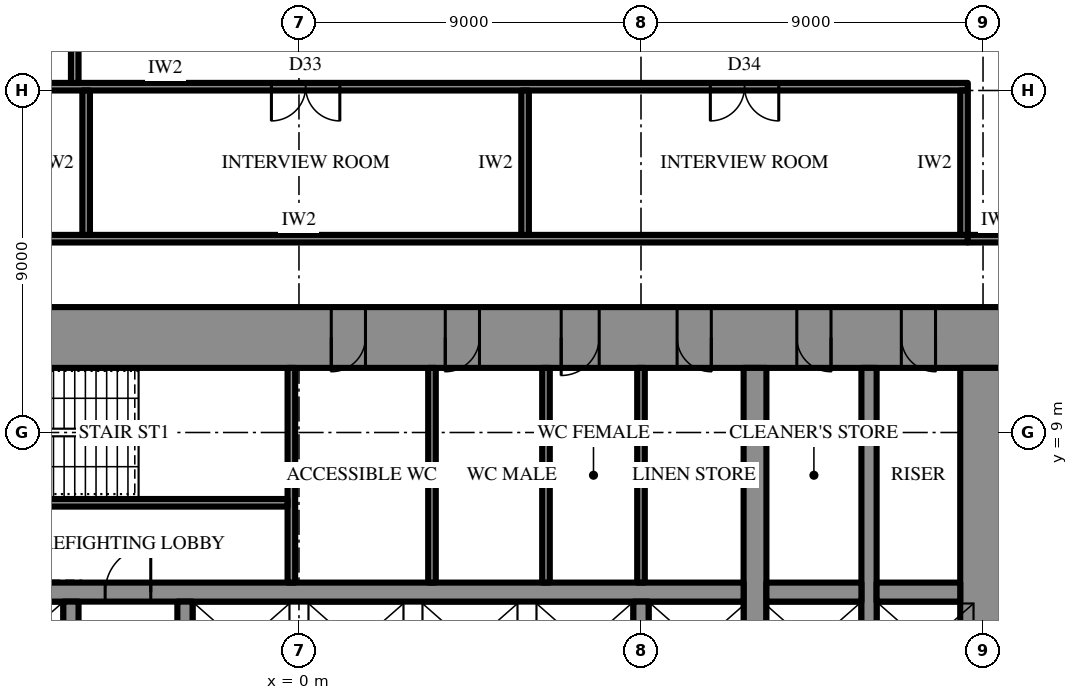
"""IFC4 building model, lengths in metres.
Left out: names, types, materials, properties, quantities, classifications, styles, units other than length and angle.
Written with IfcOpenShell. Run it as: python <this file> out.ifc"""

import sys

from ifc_helpers import new_model, si_unit, direction, frame, frame_2d, origin, place, context, subcontext, project, spatial, rectangle, extrude, element, fill, save


model = new_model("IFC4")
c1 = context("Model", 3, precision=1e-05, world=origin(), true_north=direction((0.0, 1.0)))
c2 = subcontext(c1, "Body", "Model", "MODEL_VIEW")
j1 = project(units=[si_unit("LENGTHUNIT", "METRE"), si_unit("PLANEANGLEUNIT", "RADIAN")], contexts=[c1])
p1 = place(None, origin())
s1 = spatial("IfcSite", under=j1, at=p1, CompositionType="ELEMENT")
p2 = place(p1, origin())
s2 = spatial("IfcBuilding", under=s1, at=p2, CompositionType="ELEMENT")
p3 = place(p2, frame((0.0, 0.0, 78.1)))
s3 = spatial("IfcBuildingStorey", under=s2, at=p3, CompositionType="ELEMENT", Elevation=78.1)
p4 = place(p3, frame((-18.6, 11.5, 0.0), z_axis=(0.0, 0.0, 1.0), x_axis=(1.0, 0.0, 0.0)))
e1 = element("IfcWall", 1, at=p4, inside=s3, PredefinedType="SHEAR", context=c2, shape_type="SweptSolid", body=[
    extrude(rectangle(XDim=37.2, YDim=1.6, at=frame_2d((18.6, 0.0))), origin(), (0.0, 0.0, 1.0), 4.2),
])
p5 = place(p4, frame((19.45, 0.0, 0.0)))
e2 = element("IfcOpeningElement", 2, at=p5, cuts=e1, PredefinedType="OPENING", context=c2, shape_type="SweptSolid", body=[
    extrude(rectangle(XDim=0.9, YDim=2.2, at=frame_2d((0.45, 1.1))), frame((0.0, 0.81, 0.0), z_axis=(0.0, -1.0, 0.0), x_axis=(1.0, 0.0, 0.0)), (0.0, 0.0, 1.0), 1.62),
])
p6 = place(p4, frame((22.45, 0.0, 0.0)))
e3 = element("IfcOpeningElement", 3, at=p6, cuts=e1, PredefinedType="OPENING", context=c2, shape_type="SweptSolid", body=[
    extrude(rectangle(XDim=0.9, YDim=2.2, at=frame_2d((0.45, 1.1))), frame((0.0, 0.81, 0.0), z_axis=(0.0, -1.0, 0.0), x_axis=(1.0, 0.0, 0.0)), (0.0, 0.0, 1.0), 1.62),
])
p7 = place(p4, frame((25.5, 0.0, 0.0)))
e4 = element("IfcOpeningElement", 4, at=p7, cuts=e1, PredefinedType="OPENING", context=c2, shape_type="SweptSolid", body=[
    extrude(rectangle(XDim=1.0, YDim=2.2, at=frame_2d((0.5, 1.1))), frame((0.0, 0.81, 0.0), z_axis=(0.0, -1.0, 0.0), x_axis=(1.0, 0.0, 0.0)), (0.0, 0.0, 1.0), 1.62),
])
p8 = place(p4, frame((1.85, 0.0, 0.0)))
e5 = element("IfcOpeningElement", 5, at=p8, cuts=e1, PredefinedType="OPENING", context=c2, shape_type="SweptSolid", body=[
    extrude(rectangle(XDim=0.9, YDim=2.2, at=frame_2d((0.45, 1.1))), frame((0.0, 0.81, 0.0), z_axis=(0.0, -1.0, 0.0), x_axis=(1.0, 0.0, 0.0)), (0.0, 0.0, 1.0), 1.62),
])
p9 = place(p4, frame((4.6, 0.0, 0.0)))
e6 = element("IfcOpeningElement", 6, at=p9, cuts=e1, PredefinedType="OPENING", context=c2, shape_type="SweptSolid", body=[
    extrude(rectangle(XDim=0.9, YDim=2.2, at=frame_2d((0.45, 1.1))), frame((0.0, 0.81, 0.0), z_axis=(0.0, -1.0, 0.0), x_axis=(1.0, 0.0, 0.0)), (0.0, 0.0, 1.0), 1.62),
])
p10 = place(p4, frame((7.75, 0.0, 0.0)))
e7 = element("IfcOpeningElement", 7, at=p10, cuts=e1, PredefinedType="OPENING", context=c2, shape_type="SweptSolid", body=[
    extrude(rectangle(XDim=0.9, YDim=2.2, at=frame_2d((0.45, 1.1))), frame((0.0, 0.81, 0.0), z_axis=(0.0, -1.0, 0.0), x_axis=(1.0, 0.0, 0.0)), (0.0, 0.0, 1.0), 1.62),
])
p11 = place(p4, frame((28.55, 0.0, 0.0)))
e8 = element("IfcOpeningElement", 8, at=p11, cuts=e1, PredefinedType="OPENING", context=c2, shape_type="SweptSolid", body=[
    extrude(rectangle(XDim=0.9, YDim=2.2, at=frame_2d((0.45, 1.1))), frame((0.0, 0.81, 0.0), z_axis=(0.0, -1.0, 0.0), x_axis=(1.0, 0.0, 0.0)), (0.0, 0.0, 1.0), 1.62),
])
p12 = place(p4, frame((31.7, 0.0, 0.0)))
e9 = element("IfcOpeningElement", 9, at=p12, cuts=e1, PredefinedType="OPENING", context=c2, shape_type="SweptSolid", body=[
    extrude(rectangle(XDim=0.9, YDim=2.2, at=frame_2d((0.45, 1.1))), frame((0.0, 0.81, 0.0), z_axis=(0.0, -1.0, 0.0), x_axis=(1.0, 0.0, 0.0)), (0.0, 0.0, 1.0), 1.62),
])
p13 = place(p4, frame((34.45, 0.0, 0.0)))
e10 = element("IfcOpeningElement", 10, at=p13, cuts=e1, PredefinedType="OPENING", context=c2, shape_type="SweptSolid", body=[
    extrude(rectangle(XDim=0.9, YDim=2.2, at=frame_2d((0.45, 1.1))), frame((0.0, 0.81, 0.0), z_axis=(0.0, -1.0, 0.0), x_axis=(1.0, 0.0, 0.0)), (0.0, 0.0, 1.0), 1.62),
])
p14 = place(p3, frame((18.0, -10.7, 0.0), z_axis=(0.0, 0.0, 1.0), x_axis=(0.0, 1.0, 0.0)))
e11 = element("IfcWall", 11, at=p14, inside=s3, PredefinedType="SHEAR", context=c2, shape_type="SweptSolid", body=[
    extrude(rectangle(XDim=21.4, YDim=1.2, at=frame_2d((10.7, 0.0))), origin(), (0.0, 0.0, 1.0), 4.2),
])
p15 = place(p14, frame((9.8, 0.0, 0.0)))
e12 = element("IfcOpeningElement", 12, at=p15, cuts=e11, PredefinedType="OPENING", context=c2, shape_type="SweptSolid", body=[
    extrude(rectangle(XDim=1.8, YDim=2.4, at=frame_2d((0.9, 1.2))), frame((0.0, 0.61, 0.0), z_axis=(0.0, -1.0, 0.0), x_axis=(1.0, 0.0, 0.0)), (0.0, 0.0, 1.0), 1.22),
])
p16 = place(p3, frame((12.0, -10.7, 0.0), z_axis=(0.0, 0.0, 1.0), x_axis=(0.0, 1.0, 0.0)))
e13 = element("IfcWall", 13, at=p16, inside=s3, PredefinedType="SHEAR", context=c2, shape_type="SweptSolid", body=[
    extrude(rectangle(XDim=21.4, YDim=0.6, at=frame_2d((10.7, 0.0))), origin(), (0.0, 0.0, 1.0), 4.2),
])
p17 = place(p16, frame((9.8, 0.0, 0.0)))
e14 = element("IfcOpeningElement", 14, at=p17, cuts=e13, PredefinedType="OPENING", context=c2, shape_type="SweptSolid", body=[
    extrude(rectangle(XDim=1.8, YDim=2.4, at=frame_2d((0.9, 1.2))), frame((0.0, 0.31, 0.0), z_axis=(0.0, -1.0, 0.0), x_axis=(1.0, 0.0, 0.0)), (0.0, 0.0, 1.0), 0.62),
])
p18 = place(p3, frame((15.0, -10.7, 0.0), z_axis=(0.0, 0.0, 1.0), x_axis=(0.0, 1.0, 0.0)))
e15 = element("IfcWall", 15, at=p18, inside=s3, PredefinedType="SHEAR", context=c2, shape_type="SweptSolid", body=[
    extrude(rectangle(XDim=21.4, YDim=0.4, at=frame_2d((10.7, 0.0))), origin(), (0.0, 0.0, 1.0), 4.2),
])
p19 = place(p18, frame((9.8, 0.0, 0.0)))
e16 = element("IfcOpeningElement", 16, at=p19, cuts=e15, PredefinedType="OPENING", context=c2, shape_type="SweptSolid", body=[
    extrude(rectangle(XDim=1.8, YDim=2.4, at=frame_2d((0.9, 1.2))), frame((0.0, 0.21, 0.0), z_axis=(0.0, -1.0, 0.0), x_axis=(1.0, 0.0, 0.0)), (0.0, 0.0, 1.0), 0.42),
])
p20 = place(p3, frame((-11.7, 4.8, 0.0), z_axis=(0.0, 0.0, 1.0), x_axis=(1.0, 0.0, 0.0)))
e17 = element("IfcWall", 17, at=p20, inside=s3, PredefinedType="SHEAR", context=c2, shape_type="SweptSolid", body=[
    extrude(rectangle(XDim=23.4, YDim=0.5, at=frame_2d((11.7, 0.0))), origin(), (0.0, 0.0, 1.0), 4.2),
])
p21 = place(p20, frame((6.6, 0.0, 0.0)))
e18 = element("IfcOpeningElement", 18, at=p21, cuts=e17, PredefinedType="OPENING", context=c2, shape_type="SweptSolid", body=[
    extrude(rectangle(XDim=1.2, YDim=2.2, at=frame_2d((0.6, 1.1))), frame((0.0, 0.26, 0.0), z_axis=(0.0, -1.0, 0.0), x_axis=(1.0, 0.0, 0.0)), (0.0, 0.0, 1.0), 0.52),
])
p22 = place(p20, frame((3.6, 0.0, 0.0)))
e19 = element("IfcOpeningElement", 19, at=p22, cuts=e17, PredefinedType="OPENING", context=c2, shape_type="SweptSolid", body=[
    extrude(rectangle(XDim=1.2, YDim=2.2, at=frame_2d((0.6, 1.1))), frame((0.0, 0.26, 0.0), z_axis=(0.0, -1.0, 0.0), x_axis=(1.0, 0.0, 0.0)), (0.0, 0.0, 1.0), 0.52),
])
p23 = place(p3, frame((12.3, 4.8, 0.0), z_axis=(0.0, 0.0, 1.0), x_axis=(1.0, 0.0, 0.0)))
e20 = element("IfcWall", 20, at=p23, inside=s3, PredefinedType="SHEAR", context=c2, shape_type="SweptSolid", body=[
    extrude(rectangle(XDim=2.5, YDim=0.5, at=frame_2d((1.25, 0.0))), origin(), (0.0, 0.0, 1.0), 4.2),
])
p24 = place(p3, frame((15.2, 4.8, 0.0), z_axis=(0.0, 0.0, 1.0), x_axis=(1.0, 0.0, 0.0)))
e21 = element("IfcWall", 21, at=p24, inside=s3, PredefinedType="SHEAR", context=c2, shape_type="SweptSolid", body=[
    extrude(rectangle(XDim=2.2, YDim=0.5, at=frame_2d((1.1, 0.0))), origin(), (0.0, 0.0, 1.0), 4.2),
])
for number, where, z_axis, x_axis in (
    (22, (-6.0, 2.25, 0.0), (0.0, 0.0, 1.0), (0.0, 1.0, 0.0)),
    (23, (-3.0, 2.25, 0.0), (0.0, 0.0, 1.0), (0.0, 1.0, 0.0)),
    (24, (9.0, 2.25, 0.0), (0.0, 0.0, 1.0), (0.0, 1.0, 0.0)),
):
    element("IfcWall", number, at=place(p3, frame(where, z_axis=z_axis, x_axis=x_axis)), inside=s3, PredefinedType="SHEAR", context=c2, shape_type="SweptSolid", body=[
        extrude(rectangle(XDim=2.3, YDim=0.4, at=frame_2d((1.15, 0.0))), origin(), (0.0, 0.0, 1.0), 4.2),
    ])
p25 = place(p3, frame((-0.2, 5.05, 0.0), z_axis=(0.0, 0.0, 1.0), x_axis=(0.0, 1.0, 0.0)))
e25 = element("IfcWall", 25, at=p25, inside=s3, PredefinedType="SHEAR", context=c2, shape_type="SweptSolid", body=[
    extrude(rectangle(XDim=5.65, YDim=0.2, at=frame_2d((2.825, 0.0))), origin(), (0.0, 0.0, 1.0), 4.2),
])
p26 = place(p3, frame((-8.9, 7.15, 0.0), z_axis=(0.0, 0.0, 1.0), x_axis=(1.0, 0.0, 0.0)))
e26 = element("IfcWall", 26, at=p26, inside=s3, PredefinedType="SHEAR", context=c2, shape_type="SweptSolid", body=[
    extrude(rectangle(XDim=8.6, YDim=0.2, at=frame_2d((4.3, 0.0))), origin(), (0.0, 0.0, 1.0), 4.2),
])
p27 = place(p26, frame((0.3, 0.0, 0.0)))
e27 = element("IfcOpeningElement", 27, at=p27, cuts=e26, PredefinedType="OPENING", context=c2, shape_type="SweptSolid", body=[
    extrude(rectangle(XDim=1.0, YDim=2.2, at=frame_2d((0.5, 1.1))), frame((0.0, 0.11, 0.0), z_axis=(0.0, -1.0, 0.0), x_axis=(1.0, 0.0, 0.0)), (0.0, 0.0, 1.0), 0.22),
])
for number, where, z_axis, x_axis in (
    (28, (9.0, 5.05, 0.0), (0.0, 0.0, 1.0), (0.0, 1.0, 0.0)),
    (29, (3.5, 5.05, 0.0), (0.0, 0.0, 1.0), (0.0, 1.0, 0.0)),
    (30, (6.5, 5.05, 0.0), (0.0, 0.0, 1.0), (0.0, 1.0, 0.0)),
):
    element("IfcWall", number, at=place(p3, frame(where, z_axis=z_axis, x_axis=x_axis)), inside=s3, PredefinedType="PARTITIONING", context=c2, shape_type="SweptSolid", body=[
        extrude(rectangle(XDim=5.65, YDim=0.2, at=frame_2d((2.825, 0.0))), origin(), (0.0, 0.0, 1.0), 4.0),
    ])
p28 = place(p3, frame((-17.6, 14.1, 0.0), z_axis=(0.0, 0.0, 1.0), x_axis=(1.0, 0.0, 0.0)))
e31 = element("IfcWall", 31, at=p28, inside=s3, PredefinedType="PARTITIONING", context=c2, shape_type="SweptSolid", body=[
    extrude(rectangle(XDim=35.2, YDim=0.2, at=frame_2d((17.6, 0.0))), origin(), (0.0, 0.0, 1.0), 4.0),
])
p29 = place(p3, frame((-17.6, 18.1, 0.0), z_axis=(0.0, 0.0, 1.0), x_axis=(1.0, 0.0, 0.0)))
e32 = element("IfcWall", 32, at=p29, inside=s3, PredefinedType="PARTITIONING", context=c2, shape_type="SweptSolid", body=[
    extrude(rectangle(XDim=35.2, YDim=0.2, at=frame_2d((17.6, 0.0))), origin(), (0.0, 0.0, 1.0), 4.0),
])
p30 = place(p29, frame((5.15, 0.0, 0.0)))
e33 = element("IfcOpeningElement", 33, at=p30, cuts=e32, PredefinedType="OPENING", context=c2, shape_type="SweptSolid", body=[
    extrude(rectangle(XDim=1.8, YDim=2.4, at=frame_2d((0.9, 1.2))), frame((0.0, 0.11, 0.0), z_axis=(0.0, -1.0, 0.0), x_axis=(1.0, 0.0, 0.0)), (0.0, 0.0, 1.0), 0.22),
])
p31 = place(p29, frame((16.875, 0.0, 0.0)))
e34 = element("IfcOpeningElement", 34, at=p31, cuts=e32, PredefinedType="OPENING", context=c2, shape_type="SweptSolid", body=[
    extrude(rectangle(XDim=1.8, YDim=2.4, at=frame_2d((0.9, 1.2))), frame((0.0, 0.11, 0.0), z_axis=(0.0, -1.0, 0.0), x_axis=(1.0, 0.0, 0.0)), (0.0, 0.0, 1.0), 0.22),
])
p32 = place(p29, frame((28.425, 0.0, 0.0)))
e35 = element("IfcOpeningElement", 35, at=p32, cuts=e32, PredefinedType="OPENING", context=c2, shape_type="SweptSolid", body=[
    extrude(rectangle(XDim=1.8, YDim=2.4, at=frame_2d((0.9, 1.2))), frame((0.0, 0.11, 0.0), z_axis=(0.0, -1.0, 0.0), x_axis=(1.0, 0.0, 0.0)), (0.0, 0.0, 1.0), 0.22),
])
for number, where, z_axis, x_axis in (
    (36, (-5.6, 14.2, 0.0), (0.0, 0.0, 1.0), (0.0, 1.0, 0.0)),
    (37, (5.95, 14.2, 0.0), (0.0, 0.0, 1.0), (0.0, 1.0, 0.0)),
    (38, (17.5, 14.2, 0.0), (0.0, 0.0, 1.0), (0.0, 1.0, 0.0)),
):
    element("IfcWall", number, at=place(p3, frame(where, z_axis=z_axis, x_axis=x_axis)), inside=s3, PredefinedType="PARTITIONING", context=c2, shape_type="SweptSolid", body=[
        extrude(rectangle(XDim=3.8, YDim=0.2, at=frame_2d((1.9, 0.0))), origin(), (0.0, 0.0, 1.0), 4.0),
    ])
p33 = place(p3, frame((17.6, 14.1, 0.0), z_axis=(0.0, 0.0, 1.0), x_axis=(1.0, 0.0, 0.0)))
e39 = element("IfcWall", 39, at=p33, inside=s3, PredefinedType="PARTITIONING", context=c2, shape_type="SweptSolid", body=[
    extrude(rectangle(XDim=1.6, YDim=0.2, at=frame_2d((0.8, 0.0))), origin(), (0.0, 0.0, 1.0), 4.0),
])
p34 = place(p3, frame((-5.9, 18.2, 0.0), z_axis=(0.0, 0.0, 1.0), x_axis=(0.0, 1.0, 0.0)))
e40 = element("IfcWall", 40, at=p34, inside=s3, PredefinedType="PARTITIONING", context=c2, shape_type="SweptSolid", body=[
    extrude(rectangle(XDim=14.1, YDim=0.2, at=frame_2d((7.05, 0.0))), origin(), (0.0, 0.0, 1.0), 4.0),
])
p35 = place(p34, frame((0.91, 0.0, 0.0)))
e41 = element("IfcOpeningElement", 41, at=p35, cuts=e40, PredefinedType="OPENING", context=c2, shape_type="SweptSolid", body=[
    extrude(rectangle(XDim=1.0, YDim=2.2, at=frame_2d((0.5, 1.1))), frame((0.0, 0.11, 0.0), z_axis=(0.0, -1.0, 0.0), x_axis=(1.0, 0.0, 0.0)), (0.0, 0.0, 1.0), 0.22),
])
p36 = place(p21, origin())
e42 = element("IfcDoor", 42, at=p36, inside=s3, OperationType="SINGLE_SWING_LEFT", PredefinedType="DOOR", context=c2, shape_type="SweptSolid", body=[
    extrude(rectangle(XDim=1.2, YDim=2.2, at=frame_2d((0.6, 1.1))), frame((0.0, 0.025, 0.0), z_axis=(0.0, -1.0, 0.0), x_axis=(1.0, 0.0, 0.0)), (0.0, 0.0, 1.0), 0.05),
])
fill(e18, e42)
p37 = place(p5, frame((0.9, 0.0, 0.0), z_axis=(0.0, 0.0, 1.0), x_axis=(-1.0, 0.0, 0.0)))
e43 = element("IfcDoor", 43, at=p37, inside=s3, OperationType="SINGLE_SWING_LEFT", PredefinedType="DOOR", context=c2, shape_type="SweptSolid", body=[
    extrude(rectangle(XDim=0.9, YDim=2.2, at=frame_2d((0.45, 1.1))), frame((0.0, 0.025, 0.0), z_axis=(0.0, -1.0, 0.0), x_axis=(1.0, 0.0, 0.0)), (0.0, 0.0, 1.0), 0.05),
])
fill(e2, e43)
p38 = place(p6, frame((0.9, 0.0, 0.0), z_axis=(0.0, 0.0, 1.0), x_axis=(-1.0, 0.0, 0.0)))
e44 = element("IfcDoor", 44, at=p38, inside=s3, OperationType="SINGLE_SWING_LEFT", PredefinedType="DOOR", context=c2, shape_type="SweptSolid", body=[
    extrude(rectangle(XDim=0.9, YDim=2.2, at=frame_2d((0.45, 1.1))), frame((0.0, 0.025, 0.0), z_axis=(0.0, -1.0, 0.0), x_axis=(1.0, 0.0, 0.0)), (0.0, 0.0, 1.0), 0.05),
])
fill(e3, e44)
p39 = place(p7, frame((1.0, 0.0, 0.0), z_axis=(0.0, 0.0, 1.0), x_axis=(-1.0, 0.0, 0.0)))
e45 = element("IfcDoor", 45, at=p39, inside=s3, OperationType="SINGLE_SWING_LEFT", PredefinedType="DOOR", context=c2, shape_type="SweptSolid", body=[
    extrude(rectangle(XDim=1.0, YDim=2.2, at=frame_2d((0.5, 1.1))), frame((0.0, 0.025, 0.0), z_axis=(0.0, -1.0, 0.0), x_axis=(1.0, 0.0, 0.0)), (0.0, 0.0, 1.0), 0.05),
])
fill(e4, e45)
p40 = place(p11, frame((0.9, 0.0, 0.0), z_axis=(0.0, 0.0, 1.0), x_axis=(-1.0, 0.0, 0.0)))
e46 = element("IfcDoor", 46, at=p40, inside=s3, OperationType="SINGLE_SWING_RIGHT", PredefinedType="DOOR", context=c2, shape_type="SweptSolid", body=[
    extrude(rectangle(XDim=0.9, YDim=2.2, at=frame_2d((0.45, 1.1))), frame((0.0, 0.025, 0.0), z_axis=(0.0, -1.0, 0.0), x_axis=(1.0, 0.0, 0.0)), (0.0, 0.0, 1.0), 0.05),
])
fill(e8, e46)
p41 = place(p12, frame((0.9, 0.0, 0.0), z_axis=(0.0, 0.0, 1.0), x_axis=(-1.0, 0.0, 0.0)))
e47 = element("IfcDoor", 47, at=p41, inside=s3, OperationType="SINGLE_SWING_RIGHT", PredefinedType="DOOR", context=c2, shape_type="SweptSolid", body=[
    extrude(rectangle(XDim=0.9, YDim=2.2, at=frame_2d((0.45, 1.1))), frame((0.0, 0.025, 0.0), z_axis=(0.0, -1.0, 0.0), x_axis=(1.0, 0.0, 0.0)), (0.0, 0.0, 1.0), 0.05),
])
fill(e9, e47)
p42 = place(p13, frame((0.9, 0.0, 0.0), z_axis=(0.0, 0.0, 1.0), x_axis=(-1.0, 0.0, 0.0)))
e48 = element("IfcDoor", 48, at=p42, inside=s3, OperationType="SINGLE_SWING_RIGHT", PredefinedType="DOOR", context=c2, shape_type="SweptSolid", body=[
    extrude(rectangle(XDim=0.9, YDim=2.2, at=frame_2d((0.45, 1.1))), frame((0.0, 0.025, 0.0), z_axis=(0.0, -1.0, 0.0), x_axis=(1.0, 0.0, 0.0)), (0.0, 0.0, 1.0), 0.05),
])
fill(e10, e48)
p43 = place(p31, frame((1.8, 0.0, 0.0), z_axis=(0.0, 0.0, 1.0), x_axis=(-1.0, 0.0, 0.0)))
e49 = element("IfcDoor", 49, at=p43, inside=s3, OperationType="DOUBLE_DOOR_SINGLE_SWING", PredefinedType="DOOR", context=c2, shape_type="SweptSolid", body=[
    extrude(rectangle(XDim=1.8, YDim=2.4, at=frame_2d((0.9, 1.2))), frame((0.0, 0.025, 0.0), z_axis=(0.0, -1.0, 0.0), x_axis=(1.0, 0.0, 0.0)), (0.0, 0.0, 1.0), 0.05),
])
fill(e34, e49)
p44 = place(p32, frame((1.8, 0.0, 0.0), z_axis=(0.0, 0.0, 1.0), x_axis=(-1.0, 0.0, 0.0)))
e50 = element("IfcDoor", 50, at=p44, inside=s3, OperationType="DOUBLE_DOOR_SINGLE_SWING", PredefinedType="DOOR", context=c2, shape_type="SweptSolid", body=[
    extrude(rectangle(XDim=1.8, YDim=2.4, at=frame_2d((0.9, 1.2))), frame((0.0, 0.025, 0.0), z_axis=(0.0, -1.0, 0.0), x_axis=(1.0, 0.0, 0.0)), (0.0, 0.0, 1.0), 0.05),
])
fill(e35, e50)
save(model, sys.argv[1])
